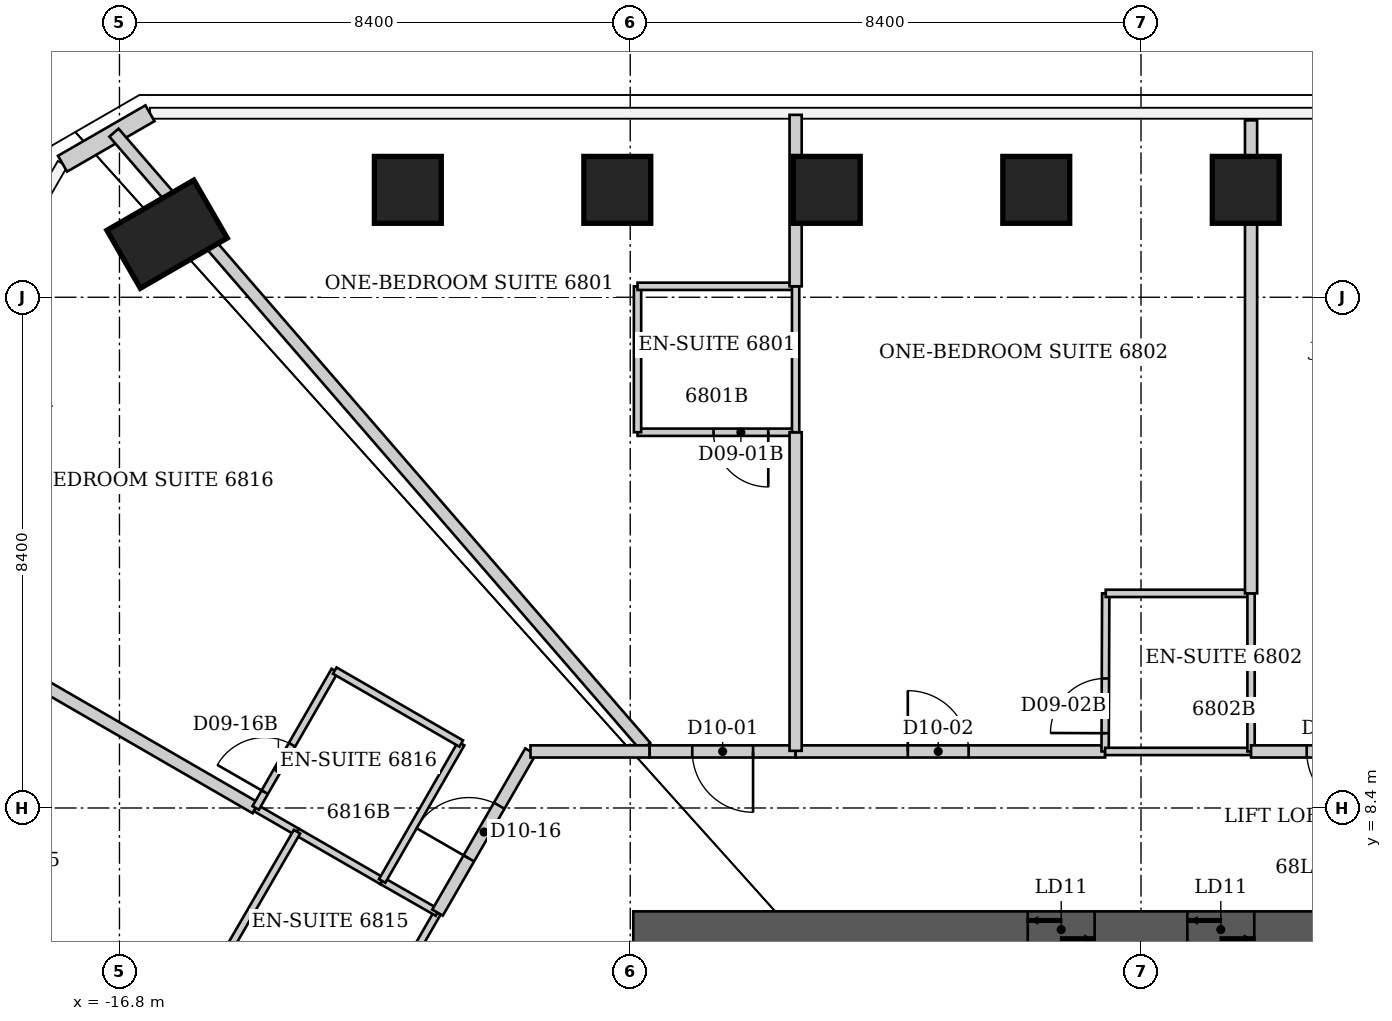
"""IFC4 building model, lengths in metres.
Left out: names, types, materials, properties, quantities, classifications, styles, units other than length and angle.
Written with IfcOpenShell. Run it as: python <this file> out.ifc"""

import sys

from ifc_helpers import new_model, si_unit, direction, frame, frame_2d, origin, origin_2d, place, context, subcontext, project, spatial, rectangle, extrude, element, fill, save


model = new_model("IFC4")
c1 = context("Model", 3, precision=1e-05, world=origin(), true_north=direction((0.0, 1.0)))
c2 = subcontext(c1, "Body", "Model", "MODEL_VIEW")
j1 = project(units=[si_unit("LENGTHUNIT", "METRE"), si_unit("PLANEANGLEUNIT", "RADIAN")], contexts=[c1])
p1 = place(None, origin())
s1 = spatial("IfcSite", under=j1, at=p1, CompositionType="ELEMENT")
p2 = place(p1, origin())
s2 = spatial("IfcBuilding", under=s1, at=p2, CompositionType="ELEMENT")
p3 = place(p2, frame((0.0, 0.0, 272.2)))
s3 = spatial("IfcBuildingStorey", under=s2, at=p3, CompositionType="ELEMENT", Elevation=272.2)
for number, where, z_axis, x_axis in (
    (1, (-12.058, 18.566, 0.0), (0.0, 0.0, 1.0), (0.0, 1.0, 0.0)),
    (2, (-8.613, 18.566, 0.0), (0.0, 0.0, 1.0), (0.0, 1.0, 0.0)),
    (3, (-5.167, 18.566, 0.0), (0.0, 0.0, 1.0), (0.0, 1.0, 0.0)),
    (4, (-1.722, 18.566, 0.0), (0.0, 0.0, 1.0), (0.0, 1.0, 0.0)),
    (5, (1.722, 18.566, 0.0), (0.0, 0.0, 1.0), (0.0, 1.0, 0.0)),
):
    element("IfcColumn", number, at=place(p3, frame(where, z_axis=z_axis, x_axis=x_axis)), inside=s3, PredefinedType="COLUMN", context=c2, shape_type="SweptSolid", body=[
        extrude(rectangle(XDim=1.1, YDim=1.1, at=origin_2d()), origin(), (0.0, 0.0, 1.0), 3.8),
    ])
p4 = place(p3, frame((-16.017, 17.837, 0.0), z_axis=(0.0, 0.0, 1.0), x_axis=(-0.5, 0.866025403784, 0.0)))
e6 = element("IfcColumn", 6, at=p4, inside=s3, PredefinedType="COLUMN", context=c2, shape_type="SweptSolid", body=[
    extrude(rectangle(XDim=1.1, YDim=1.65, at=origin_2d()), origin(), (0.0, 0.0, 1.0), 3.8),
])
p5 = place(p3, frame((-8.35, 6.4, 0.0), z_axis=(0.0, 0.0, 1.0), x_axis=(1.0, 0.0, 0.0)))
e7 = element("IfcWall", 7, at=p5, inside=s3, PredefinedType="SHEAR", context=c2, shape_type="SweptSolid", body=[
    extrude(rectangle(XDim=16.7, YDim=0.6, at=frame_2d((8.35, 0.0))), origin(), (0.0, 0.0, 1.0), 3.8),
])
p6 = place(p5, frame((6.488, 0.0, 0.0)))
e8 = element("IfcOpeningElement", 8, at=p6, cuts=e7, PredefinedType="OPENING", context=c2, shape_type="SweptSolid", body=[
    extrude(rectangle(XDim=1.1, YDim=2.1, at=frame_2d((0.55, 1.05))), frame((0.0, 0.3, 0.0), z_axis=(0.0, -1.0, 0.0), x_axis=(1.0, 0.0, 0.0)), (0.0, 0.0, 1.0), 0.6),
])
p7 = place(p5, frame((9.113, 0.0, 0.0)))
e9 = element("IfcOpeningElement", 9, at=p7, cuts=e7, PredefinedType="OPENING", context=c2, shape_type="SweptSolid", body=[
    extrude(rectangle(XDim=1.1, YDim=2.1, at=frame_2d((0.55, 1.05))), frame((0.0, 0.3, 0.0), z_axis=(0.0, -1.0, 0.0), x_axis=(1.0, 0.0, 0.0)), (0.0, 0.0, 1.0), 0.6),
])
p8 = place(p5, frame((11.738, 0.0, 0.0)))
e10 = element("IfcOpeningElement", 10, at=p8, cuts=e7, PredefinedType="OPENING", context=c2, shape_type="SweptSolid", body=[
    extrude(rectangle(XDim=1.1, YDim=2.1, at=frame_2d((0.55, 1.05))), frame((0.0, 0.3, 0.0), z_axis=(0.0, -1.0, 0.0), x_axis=(1.0, 0.0, 0.0)), (0.0, 0.0, 1.0), 0.6),
])
p9 = place(p5, frame((14.363, 0.0, 0.0)))
e11 = element("IfcOpeningElement", 11, at=p9, cuts=e7, PredefinedType="OPENING", context=c2, shape_type="SweptSolid", body=[
    extrude(rectangle(XDim=1.1, YDim=2.1, at=frame_2d((0.55, 1.05))), frame((0.0, 0.3, 0.0), z_axis=(0.0, -1.0, 0.0), x_axis=(1.0, 0.0, 0.0)), (0.0, 0.0, 1.0), 0.6),
])
p10 = place(p3, frame((-17.736, 18.996, 0.0), z_axis=(0.0, 0.0, 1.0), x_axis=(0.866026405774, 0.499998264499, 0.0)))
e12 = element("IfcWall", 12, at=p10, inside=s3, PredefinedType="SOLIDWALL", context=c2, shape_type="SweptSolid", body=[
    extrude(rectangle(XDim=1.66, YDim=0.3, at=frame_2d((0.83, 0.0))), origin(), (0.0, 0.0, 1.0), 3.64),
])
p11 = place(p3, frame((-21.426, 12.37, 0.0), z_axis=(0.0, 0.0, 1.0), x_axis=(0.865702942609, -0.500558103679, 0.0)))
e13 = element("IfcWall", 13, at=p11, inside=s3, PredefinedType="PARTITIONING", context=c2, shape_type="SweptSolid", body=[
    extrude(rectangle(XDim=7.931, YDim=0.2, at=frame_2d((3.966, 0.0))), origin(), (0.0, 0.0, 1.0), 2.878),
])
p12 = place(p3, frame((-14.56, 8.4, 0.0), z_axis=(0.0, 0.0, 1.0), x_axis=(0.866242622795, -0.499623576758, 0.0)))
e14 = element("IfcWall", 14, at=p12, inside=s3, PredefinedType="PARTITIONING", context=c2, shape_type="SweptSolid", body=[
    extrude(rectangle(XDim=0.784, YDim=0.12, at=frame_2d((0.392, 0.0))), origin(), (0.0, 0.0, 1.0), 2.878),
])
p13 = place(p3, frame((-13.881, 8.008, 0.0), z_axis=(0.0, 0.0, 1.0), x_axis=(0.866183073342, -0.499726808823, 0.0)))
e15 = element("IfcWall", 15, at=p13, inside=s3, PredefinedType="PARTITIONING", context=c2, shape_type="SweptSolid", body=[
    extrude(rectangle(XDim=1.618, YDim=0.12, at=frame_2d((0.809, 0.0))), origin(), (0.0, 0.0, 1.0), 2.878),
])
p14 = place(p3, frame((-13.88, 8.01, 0.0), z_axis=(0.0, 0.0, 1.0), x_axis=(-0.501888006485, -0.864932615264, 0.0)))
e16 = element("IfcWall", 16, at=p14, inside=s3, PredefinedType="PARTITIONING", context=c2, shape_type="SweptSolid", body=[
    extrude(rectangle(XDim=2.451, YDim=0.12, at=frame_2d((1.226, 0.0))), origin(), (0.0, 0.0, 1.0), 3.64),
])
p15 = place(p3, frame((-13.26, 10.66, 0.0), z_axis=(0.0, 0.0, 1.0), x_axis=(-0.498627694264, -0.866816256489, 0.0)))
e17 = element("IfcWall", 17, at=p15, inside=s3, PredefinedType="PARTITIONING", context=c2, shape_type="SweptSolid", body=[
    extrude(rectangle(XDim=2.607, YDim=0.12, at=frame_2d((1.304, 0.0))), origin(), (0.0, 0.0, 1.0), 3.64),
])
p16 = place(p15, frame((1.407, 0.0, 0.0)))
e18 = element("IfcOpeningElement", 18, at=p16, cuts=e17, PredefinedType="OPENING", context=c2, shape_type="SweptSolid", body=[
    extrude(rectangle(XDim=0.9, YDim=2.03, at=frame_2d((0.45, 1.015))), frame((0.0, 0.06, 0.0), z_axis=(0.0, -1.0, 0.0), x_axis=(1.0, 0.0, 0.0)), (0.0, 0.0, 1.0), 0.12),
])
p17 = place(p3, frame((-12.79, 4.56, 0.0), z_axis=(0.0, 0.0, 1.0), x_axis=(0.499252904436, 0.866456310158, 0.0)))
e19 = element("IfcWall", 19, at=p17, inside=s3, PredefinedType="PARTITIONING", context=c2, shape_type="SweptSolid", body=[
    extrude(rectangle(XDim=2.446, YDim=0.12, at=frame_2d((1.223, 0.0))), origin(), (0.0, 0.0, 1.0), 3.64),
])
p18 = place(p3, frame((-12.48, 7.2, 0.0), z_axis=(0.0, 0.0, 1.0), x_axis=(0.868214469581, -0.496189111942, 0.0)))
e20 = element("IfcWall", 20, at=p18, inside=s3, PredefinedType="PARTITIONING", context=c2, shape_type="SweptSolid", body=[
    extrude(rectangle(XDim=1.048, YDim=0.12, at=frame_2d((0.524, 0.0))), origin(), (0.0, 0.0, 1.0), 2.878),
])
p19 = place(p3, frame((-12.48, 7.2, 0.0), z_axis=(0.0, 0.0, 1.0), x_axis=(0.498627694264, 0.866816256489, 0.0)))
e21 = element("IfcWall", 21, at=p19, inside=s3, PredefinedType="PARTITIONING", context=c2, shape_type="SweptSolid", body=[
    extrude(rectangle(XDim=2.607, YDim=0.12, at=frame_2d((1.304, 0.0))), origin(), (0.0, 0.0, 1.0), 3.64),
])
p20 = place(p3, frame((-11.569, 6.679, 0.0), z_axis=(0.0, 0.0, 1.0), x_axis=(0.499623447589, 0.866242697297, 0.0)))
e22 = element("IfcWall", 22, at=p20, inside=s3, PredefinedType="PARTITIONING", context=c2, shape_type="SweptSolid", body=[
    extrude(rectangle(XDim=3.06, YDim=0.2, at=frame_2d((1.53, 0.0))), origin(), (0.0, 0.0, 1.0), 3.64),
])
p21 = place(p20, frame((1.03, 0.0, 0.0)))
e23 = element("IfcOpeningElement", 23, at=p21, cuts=e22, PredefinedType="OPENING", context=c2, shape_type="SweptSolid", body=[
    extrude(rectangle(XDim=1.0, YDim=2.13, at=frame_2d((0.5, 1.065))), frame((0.0, 0.1, 0.0), z_axis=(0.0, -1.0, 0.0), x_axis=(1.0, 0.0, 0.0)), (0.0, 0.0, 1.0), 0.2),
])
p22 = place(p3, frame((-11.18, 9.46, 0.0), z_axis=(0.0, 0.0, 1.0), x_axis=(-0.866202511239, 0.499693115345, 0.0)))
e24 = element("IfcWall", 24, at=p22, inside=s3, PredefinedType="PARTITIONING", context=c2, shape_type="SweptSolid", body=[
    extrude(rectangle(XDim=2.401, YDim=0.12, at=frame_2d((1.201, 0.0))), origin(), (0.0, 0.0, 1.0), 3.64),
])
p23 = place(p3, frame((-8.28, 14.58, 0.0), z_axis=(0.0, 0.0, 1.0), x_axis=(1.0, 0.0, 0.0)))
e25 = element("IfcWall", 25, at=p23, inside=s3, PredefinedType="PARTITIONING", context=c2, shape_type="SweptSolid", body=[
    extrude(rectangle(XDim=2.6, YDim=0.12, at=frame_2d((1.3, 0.0))), origin(), (0.0, 0.0, 1.0), 3.64),
])
p24 = place(p23, frame((1.25, 0.0, 0.0)))
e26 = element("IfcOpeningElement", 26, at=p24, cuts=e25, PredefinedType="OPENING", context=c2, shape_type="SweptSolid", body=[
    extrude(rectangle(XDim=0.9, YDim=2.03, at=frame_2d((0.45, 1.015))), frame((0.0, 0.06, 0.0), z_axis=(0.0, -1.0, 0.0), x_axis=(1.0, 0.0, 0.0)), (0.0, 0.0, 1.0), 0.12),
])
p25 = place(p3, frame((-8.28, 16.98, 0.0), z_axis=(0.0, 0.0, 1.0), x_axis=(0.0, -1.0, 0.0)))
e27 = element("IfcWall", 27, at=p25, inside=s3, PredefinedType="PARTITIONING", context=c2, shape_type="SweptSolid", body=[
    extrude(rectangle(XDim=2.4, YDim=0.12, at=frame_2d((1.2, 0.0))), origin(), (0.0, 0.0, 1.0), 3.64),
])
p26 = place(p3, frame((-8.146, 9.406, 0.0), z_axis=(0.0, 0.0, 1.0), x_axis=(-0.654501911032, 0.756060347099, 0.0)))
e28 = element("IfcWall", 28, at=p26, inside=s3, PredefinedType="PARTITIONING", context=c2, shape_type="SweptSolid", body=[
    extrude(rectangle(XDim=13.361, YDim=0.2, at=frame_2d((6.681, 0.0))), origin(), (0.0, 0.0, 1.0), 3.64),
])
p27 = place(p3, frame((-8.08, 9.33, 0.0), z_axis=(0.0, 0.0, 1.0), x_axis=(-1.0, 0.0, 0.0)))
e29 = element("IfcWall", 29, at=p27, inside=s3, PredefinedType="PARTITIONING", context=c2, shape_type="SweptSolid", body=[
    extrude(rectangle(XDim=1.96, YDim=0.2, at=frame_2d((0.98, 0.0))), origin(), (0.0, 0.0, 1.0), 3.64),
])
p28 = place(p3, frame((-5.68, 9.33, 0.0), z_axis=(0.0, 0.0, 1.0), x_axis=(-1.0, 0.0, 0.0)))
e30 = element("IfcWall", 30, at=p28, inside=s3, PredefinedType="PARTITIONING", context=c2, shape_type="SweptSolid", body=[
    extrude(rectangle(XDim=2.4, YDim=0.2, at=frame_2d((1.2, 0.0))), origin(), (0.0, 0.0, 1.0), 3.64),
])
p29 = place(p28, frame((0.7, 0.0, 0.0)))
e31 = element("IfcOpeningElement", 31, at=p29, cuts=e30, PredefinedType="OPENING", context=c2, shape_type="SweptSolid", body=[
    extrude(rectangle(XDim=1.0, YDim=2.13, at=frame_2d((0.5, 1.065))), frame((0.0, 0.1, 0.0), z_axis=(0.0, -1.0, 0.0), x_axis=(1.0, 0.0, 0.0)), (0.0, 0.0, 1.0), 0.2),
])
p30 = place(p3, frame((-5.68, 9.33, 0.0), z_axis=(0.0, 0.0, 1.0), x_axis=(1.0, 0.0, 0.0)))
e32 = element("IfcWall", 32, at=p30, inside=s3, PredefinedType="PARTITIONING", context=c2, shape_type="SweptSolid", body=[
    extrude(rectangle(XDim=5.09, YDim=0.2, at=frame_2d((2.545, 0.0))), origin(), (0.0, 0.0, 1.0), 3.64),
])
p31 = place(p30, frame((1.845, 0.0, 0.0)))
e33 = element("IfcOpeningElement", 33, at=p31, cuts=e32, PredefinedType="OPENING", context=c2, shape_type="SweptSolid", body=[
    extrude(rectangle(XDim=1.0, YDim=2.13, at=frame_2d((0.5, 1.065))), frame((0.0, 0.1, 0.0), z_axis=(0.0, -1.0, 0.0), x_axis=(1.0, 0.0, 0.0)), (0.0, 0.0, 1.0), 0.2),
])
p32 = place(p3, frame((-5.68, 14.58, 0.0), z_axis=(0.0, 0.0, 1.0), x_axis=(0.0, -1.0, 0.0)))
e34 = element("IfcWall", 34, at=p32, inside=s3, PredefinedType="PARTITIONING", context=c2, shape_type="SweptSolid", body=[
    extrude(rectangle(XDim=5.24, YDim=0.2, at=frame_2d((2.62, 0.0))), origin(), (0.0, 0.0, 1.0), 3.64),
])
p33 = place(p3, frame((-5.68, 16.98, 0.0), z_axis=(0.0, 0.0, 1.0), x_axis=(-1.0, 0.0, 0.0)))
e35 = element("IfcWall", 35, at=p33, inside=s3, PredefinedType="PARTITIONING", context=c2, shape_type="SweptSolid", body=[
    extrude(rectangle(XDim=2.6, YDim=0.12, at=frame_2d((1.3, 0.0))), origin(), (0.0, 0.0, 1.0), 3.64),
])
p34 = place(p3, frame((-5.68, 16.98, 0.0), z_axis=(0.0, 0.0, 1.0), x_axis=(0.0, -1.0, 0.0)))
e36 = element("IfcWall", 36, at=p34, inside=s3, PredefinedType="PARTITIONING", context=c2, shape_type="SweptSolid", body=[
    extrude(rectangle(XDim=2.4, YDim=0.12, at=frame_2d((1.2, 0.0))), origin(), (0.0, 0.0, 1.0), 3.64),
])
p35 = place(p3, frame((-5.68, 19.8, 0.0), z_axis=(0.0, 0.0, 1.0), x_axis=(0.0, -1.0, 0.0)))
e37 = element("IfcWall", 37, at=p35, inside=s3, PredefinedType="PARTITIONING", context=c2, shape_type="SweptSolid", body=[
    extrude(rectangle(XDim=2.82, YDim=0.2, at=frame_2d((1.41, 0.0))), origin(), (0.0, 0.0, 1.0), 3.64),
])
p36 = place(p3, frame((-0.58, 11.93, 0.0), z_axis=(0.0, 0.0, 1.0), x_axis=(-0.003850098237, -0.999992588344, 0.0)))
e38 = element("IfcWall", 38, at=p36, inside=s3, PredefinedType="PARTITIONING", context=c2, shape_type="SweptSolid", body=[
    extrude(rectangle(XDim=2.6, YDim=0.12, at=frame_2d((1.3, 0.0))), origin(), (0.0, 0.0, 1.0), 3.64),
])
p37 = place(p36, frame((1.4, 0.0, 0.0)))
e39 = element("IfcOpeningElement", 39, at=p37, cuts=e38, PredefinedType="OPENING", context=c2, shape_type="SweptSolid", body=[
    extrude(rectangle(XDim=0.9, YDim=2.03, at=frame_2d((0.45, 1.015))), frame((0.0, 0.06, 0.0), z_axis=(0.0, -1.0, 0.0), x_axis=(1.0, 0.0, 0.0)), (0.0, 0.0, 1.0), 0.12),
])
p38 = place(p3, frame((1.81, 9.33, 0.0), z_axis=(0.0, 0.0, 1.0), x_axis=(-1.0, 0.0, 0.0)))
e40 = element("IfcWall", 40, at=p38, inside=s3, PredefinedType="PARTITIONING", context=c2, shape_type="SweptSolid", body=[
    extrude(rectangle(XDim=2.4, YDim=0.12, at=frame_2d((1.2, 0.0))), origin(), (0.0, 0.0, 1.0), 3.64),
])
p39 = place(p3, frame((1.81, 11.93, 0.0), z_axis=(0.0, 0.0, 1.0), x_axis=(-1.0, 0.0, 0.0)))
e41 = element("IfcWall", 41, at=p39, inside=s3, PredefinedType="PARTITIONING", context=c2, shape_type="SweptSolid", body=[
    extrude(rectangle(XDim=2.39, YDim=0.12, at=frame_2d((1.195, 0.0))), origin(), (0.0, 0.0, 1.0), 3.64),
])
p40 = place(p3, frame((1.81, 11.93, 0.0), z_axis=(0.0, 0.0, 1.0), x_axis=(0.0, -1.0, 0.0)))
e42 = element("IfcWall", 42, at=p40, inside=s3, PredefinedType="PARTITIONING", context=c2, shape_type="SweptSolid", body=[
    extrude(rectangle(XDim=2.6, YDim=0.12, at=frame_2d((1.3, 0.0))), origin(), (0.0, 0.0, 1.0), 3.023),
])
p41 = place(p3, frame((1.81, 19.71, 0.0), z_axis=(0.0, 0.0, 1.0), x_axis=(0.0, -1.0, 0.0)))
e43 = element("IfcWall", 43, at=p41, inside=s3, PredefinedType="PARTITIONING", context=c2, shape_type="SweptSolid", body=[
    extrude(rectangle(XDim=7.78, YDim=0.2, at=frame_2d((3.89, 0.0))), origin(), (0.0, 0.0, 1.0), 3.023),
])
p42 = place(p3, frame((4.64, 9.33, 0.0), z_axis=(0.0, 0.0, 1.0), x_axis=(-1.0, 0.0, 0.0)))
e44 = element("IfcWall", 44, at=p42, inside=s3, PredefinedType="PARTITIONING", context=c2, shape_type="SweptSolid", body=[
    extrude(rectangle(XDim=2.83, YDim=0.2, at=frame_2d((1.415, 0.0))), origin(), (0.0, 0.0, 1.0), 3.64),
])
p43 = place(p42, frame((0.915, 0.0, 0.0)))
e45 = element("IfcOpeningElement", 45, at=p43, cuts=e44, PredefinedType="OPENING", context=c2, shape_type="SweptSolid", body=[
    extrude(rectangle(XDim=1.0, YDim=2.13, at=frame_2d((0.5, 1.065))), frame((0.0, 0.1, 0.0), z_axis=(0.0, -1.0, 0.0), x_axis=(1.0, 0.0, 0.0)), (0.0, 0.0, 1.0), 0.2),
])
p44 = place(p29, origin())
e46 = element("IfcDoor", 46, at=p44, inside=s3, OperationType="SINGLE_SWING_LEFT", PredefinedType="DOOR", context=c2, shape_type="SweptSolid", body=[
    extrude(rectangle(XDim=1.0, YDim=2.13, at=frame_2d((0.5, 1.065))), frame((0.0, 0.025, 0.0), z_axis=(0.0, -1.0, 0.0), x_axis=(1.0, 0.0, 0.0)), (0.0, 0.0, 1.0), 0.05),
])
fill(e31, e46)
p45 = place(p24, origin())
e47 = element("IfcDoor", 47, at=p45, inside=s3, OperationType="SINGLE_SWING_RIGHT", PredefinedType="DOOR", context=c2, shape_type="SweptSolid", body=[
    extrude(rectangle(XDim=0.9, YDim=2.03, at=frame_2d((0.45, 1.015))), frame((0.0, 0.025, 0.0), z_axis=(0.0, -1.0, 0.0), x_axis=(1.0, 0.0, 0.0)), (0.0, 0.0, 1.0), 0.05),
])
fill(e26, e47)
p46 = place(p31, origin())
e48 = element("IfcDoor", 48, at=p46, inside=s3, OperationType="SINGLE_SWING_LEFT", PredefinedType="DOOR", context=c2, shape_type="SweptSolid", body=[
    extrude(rectangle(XDim=1.0, YDim=2.13, at=frame_2d((0.5, 1.065))), frame((0.0, 0.025, 0.0), z_axis=(0.0, -1.0, 0.0), x_axis=(1.0, 0.0, 0.0)), (0.0, 0.0, 1.0), 0.05),
])
fill(e33, e48)
p47 = place(p37, origin())
e49 = element("IfcDoor", 49, at=p47, inside=s3, OperationType="SINGLE_SWING_RIGHT", PredefinedType="DOOR", context=c2, shape_type="SweptSolid", body=[
    extrude(rectangle(XDim=0.9, YDim=2.03, at=frame_2d((0.45, 1.015))), frame((0.0, 0.025, 0.0), z_axis=(0.0, -1.0, 0.0), x_axis=(1.0, 0.0, 0.0)), (0.0, 0.0, 1.0), 0.05),
])
fill(e39, e49)
p48 = place(p43, origin())
e50 = element("IfcDoor", 50, at=p48, inside=s3, OperationType="SINGLE_SWING_LEFT", PredefinedType="DOOR", context=c2, shape_type="SweptSolid", body=[
    extrude(rectangle(XDim=1.0, YDim=2.13, at=frame_2d((0.5, 1.065))), frame((0.0, 0.025, 0.0), z_axis=(0.0, -1.0, 0.0), x_axis=(1.0, 0.0, 0.0)), (0.0, 0.0, 1.0), 0.05),
])
fill(e45, e50)
p49 = place(p21, origin())
e51 = element("IfcDoor", 51, at=p49, inside=s3, OperationType="SINGLE_SWING_LEFT", PredefinedType="DOOR", context=c2, shape_type="SweptSolid", body=[
    extrude(rectangle(XDim=1.0, YDim=2.13, at=frame_2d((0.5, 1.065))), frame((0.0, 0.025, 0.0), z_axis=(0.0, -1.0, 0.0), x_axis=(1.0, 0.0, 0.0)), (0.0, 0.0, 1.0), 0.05),
])
fill(e23, e51)
p50 = place(p16, origin())
e52 = element("IfcDoor", 52, at=p50, inside=s3, OperationType="SINGLE_SWING_RIGHT", PredefinedType="DOOR", context=c2, shape_type="SweptSolid", body=[
    extrude(rectangle(XDim=0.9, YDim=2.03, at=frame_2d((0.45, 1.015))), frame((0.0, 0.025, 0.0), z_axis=(0.0, -1.0, 0.0), x_axis=(1.0, 0.0, 0.0)), (0.0, 0.0, 1.0), 0.05),
])
fill(e18, e52)
p51 = place(p6, origin())
e53 = element("IfcDoor", 53, at=p51, inside=s3, OperationType="DOUBLE_DOOR_SLIDING", PredefinedType="DOOR", context=c2, shape_type="SweptSolid", body=[
    extrude(rectangle(XDim=1.1, YDim=2.1, at=frame_2d((0.55, 1.05))), frame((0.0, 0.025, 0.0), z_axis=(0.0, -1.0, 0.0), x_axis=(1.0, 0.0, 0.0)), (0.0, 0.0, 1.0), 0.05),
])
fill(e8, e53)
p52 = place(p7, origin())
e54 = element("IfcDoor", 54, at=p52, inside=s3, OperationType="DOUBLE_DOOR_SLIDING", PredefinedType="DOOR", context=c2, shape_type="SweptSolid", body=[
    extrude(rectangle(XDim=1.1, YDim=2.1, at=frame_2d((0.55, 1.05))), frame((0.0, 0.025, 0.0), z_axis=(0.0, -1.0, 0.0), x_axis=(1.0, 0.0, 0.0)), (0.0, 0.0, 1.0), 0.05),
])
fill(e9, e54)
save(model, sys.argv[1])
